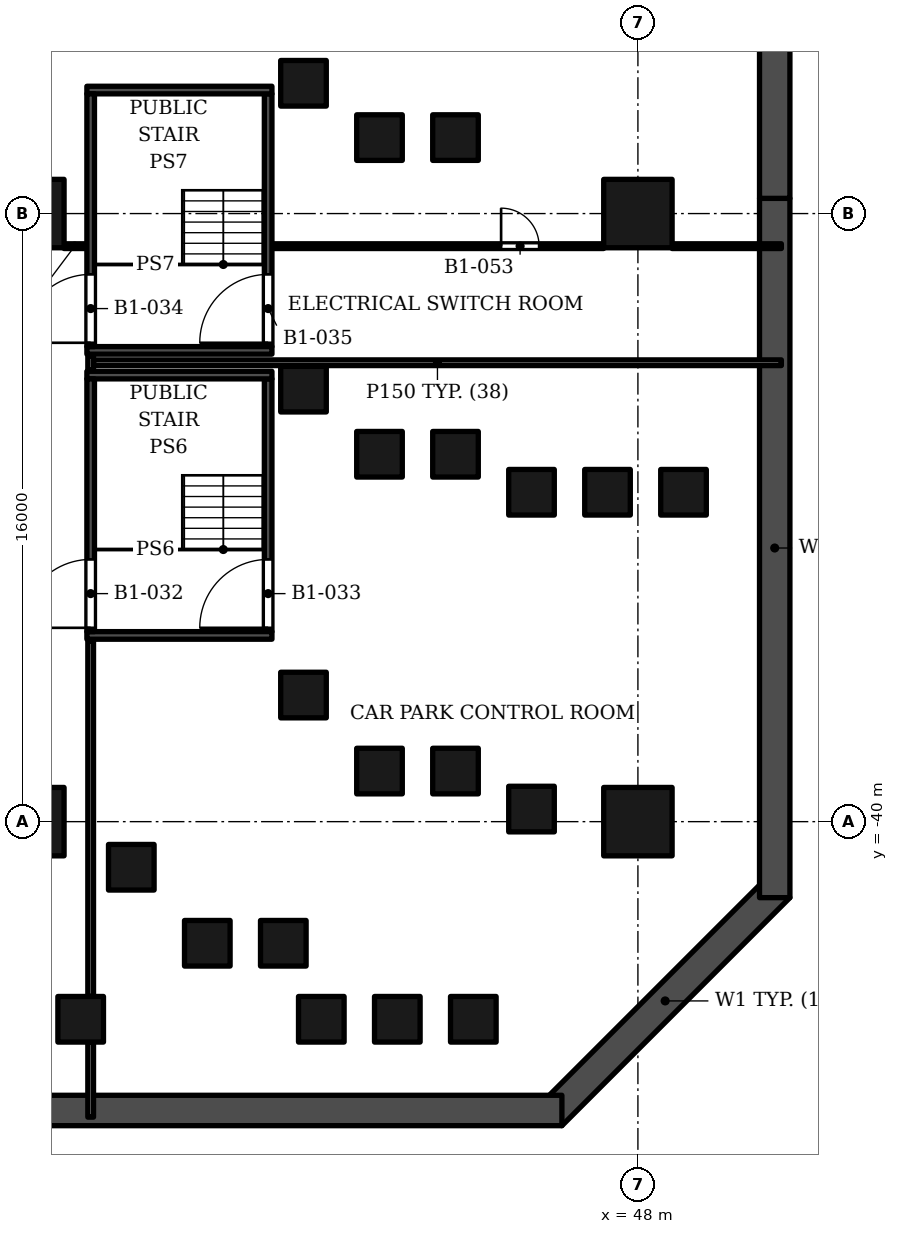
"""IFC4 building model, lengths in metres.
Left out: names, types, materials, properties, quantities, classifications, styles, units other than length and angle.
Written with IfcOpenShell. Run it as: python <this file> out.ifc"""

import sys

from ifc_helpers import new_model, si_unit, direction, frame, frame_2d, origin, origin_2d, place, context, subcontext, project, spatial, rectangle, extrude, element, fill, save


model = new_model("IFC4")
c1 = context("Model", 3, precision=1e-05, world=origin(), true_north=direction((0.0, 1.0)))
c2 = subcontext(c1, "Body", "Model", "MODEL_VIEW")
j1 = project(units=[si_unit("LENGTHUNIT", "METRE"), si_unit("PLANEANGLEUNIT", "RADIAN")], contexts=[c1])
p1 = place(None, origin())
s1 = spatial("IfcSite", under=j1, at=p1, CompositionType="ELEMENT")
p2 = place(p1, origin())
s2 = spatial("IfcBuilding", under=s1, at=p2, CompositionType="ELEMENT")
p3 = place(p2, frame((0.0, 0.0, -5.0)))
s3 = spatial("IfcBuildingStorey", under=s2, at=p3, CompositionType="ELEMENT", Elevation=-5.0)
p4 = place(p3, frame((51.6, -23.6, 0.0), z_axis=(0.0, 0.0, 1.0), x_axis=(0.0, 1.0, 0.0)))
e1 = element("IfcWall", 1, at=p4, inside=s3, PredefinedType="SHEAR", context=c2, shape_type="SweptSolid", body=[
    extrude(rectangle(XDim=12.0, YDim=0.8, at=frame_2d((6.0, 0.0))), origin(), (0.0, 0.0, 1.0), 5.0),
])
p5 = place(p4, frame((4.0, 0.0, 0.0)))
e2 = element("IfcOpeningElement", 2, at=p5, cuts=e1, PredefinedType="OPENING", context=c2, shape_type="SweptSolid", body=[
    extrude(rectangle(XDim=4.0, YDim=2.5, at=frame_2d((2.0, 1.25))), frame((0.0, 0.41, 0.0), z_axis=(0.0, -1.0, 0.0), x_axis=(1.0, 0.0, 0.0)), (0.0, 0.0, 1.0), 0.82),
])
p6 = place(p3, frame((45.717, -47.717, 0.0), z_axis=(0.0, 0.0, 1.0), x_axis=(0.707106781187, 0.707106781187, 0.0)))
e3 = element("IfcWall", 3, at=p6, inside=s3, PredefinedType="SHEAR", context=c2, shape_type="SweptSolid", body=[
    extrude(rectangle(XDim=8.485, YDim=0.8, at=frame_2d((4.243, 0.0))), origin(), (0.0, 0.0, 1.0), 5.0),
])
p7 = place(p3, frame((51.6, -42.0, 0.0), z_axis=(0.0, 0.0, 1.0), x_axis=(0.0, 1.0, 0.0)))
e4 = element("IfcWall", 4, at=p7, inside=s3, PredefinedType="SHEAR", context=c2, shape_type="SweptSolid", body=[
    extrude(rectangle(XDim=18.4, YDim=0.8, at=frame_2d((9.2, 0.0))), origin(), (0.0, 0.0, 1.0), 5.0),
])
p8 = place(p3, frame((-46.0, -47.6, 0.0), z_axis=(0.0, 0.0, 1.0), x_axis=(1.0, 0.0, 0.0)))
e5 = element("IfcWall", 5, at=p8, inside=s3, PredefinedType="SHEAR", context=c2, shape_type="SweptSolid", body=[
    extrude(rectangle(XDim=92.0, YDim=0.8, at=frame_2d((46.0, 0.0))), origin(), (0.0, 0.0, 1.0), 5.0),
])
for number, where, z_axis, x_axis in (
    (6, (32.0, -40.0, 0.0), (0.0, 0.0, 1.0), (1.0, 0.0, 0.0)),
    (7, (32.0, -24.0, 0.0), (0.0, 0.0, 1.0), (1.0, 0.0, 0.0)),
    (8, (48.0, -40.0, 0.0), (0.0, 0.0, 1.0), (1.0, 0.0, 0.0)),
    (9, (48.0, -24.0, 0.0), (0.0, 0.0, 1.0), (1.0, 0.0, 0.0)),
):
    element("IfcColumn", number, at=place(p3, frame(where, z_axis=z_axis, x_axis=x_axis)), inside=s3, PredefinedType="COLUMN", context=c2, shape_type="SweptSolid", body=[
        extrude(rectangle(XDim=1.8, YDim=1.8, at=origin_2d()), origin(), (0.0, 0.0, 1.0), 5.0),
    ])
for number, where, z_axis, x_axis in (
    (10, (39.2, -36.669, 0.0), (0.0, 0.0, 1.0), (1.0, 0.0, 0.0)),
    (11, (34.669, -41.2, 0.0), (0.0, 0.0, 1.0), (1.0, 0.0, 0.0)),
    (12, (39.2, -20.572, 0.0), (0.0, 0.0, 1.0), (1.0, 0.0, 0.0)),
    (13, (39.2, -28.62, 0.0), (0.0, 0.0, 1.0), (1.0, 0.0, 0.0)),
    (14, (41.2, -38.669, 0.0), (0.0, 0.0, 1.0), (1.0, 0.0, 0.0)),
    (15, (36.669, -43.2, 0.0), (0.0, 0.0, 1.0), (1.0, 0.0, 0.0)),
    (16, (41.2, -22.001, 0.0), (0.0, 0.0, 1.0), (1.0, 0.0, 0.0)),
    (17, (41.2, -30.333, 0.0), (0.0, 0.0, 1.0), (1.0, 0.0, 0.0)),
    (18, (43.2, -38.669, 0.0), (0.0, 0.0, 1.0), (1.0, 0.0, 0.0)),
    (19, (38.669, -43.2, 0.0), (0.0, 0.0, 1.0), (1.0, 0.0, 0.0)),
    (20, (43.2, -22.001, 0.0), (0.0, 0.0, 1.0), (1.0, 0.0, 0.0)),
    (21, (43.2, -30.333, 0.0), (0.0, 0.0, 1.0), (1.0, 0.0, 0.0)),
    (22, (45.2, -39.669, 0.0), (0.0, 0.0, 1.0), (1.0, 0.0, 0.0)),
    (23, (39.669, -45.2, 0.0), (0.0, 0.0, 1.0), (1.0, 0.0, 0.0)),
    (24, (45.2, -31.333, 0.0), (0.0, 0.0, 1.0), (1.0, 0.0, 0.0)),
    (25, (41.669, -45.2, 0.0), (0.0, 0.0, 1.0), (1.0, 0.0, 0.0)),
    (26, (47.2, -31.333, 0.0), (0.0, 0.0, 1.0), (1.0, 0.0, 0.0)),
    (27, (33.337, -45.2, 0.0), (0.0, 0.0, 1.0), (1.0, 0.0, 0.0)),
    (28, (43.669, -45.2, 0.0), (0.0, 0.0, 1.0), (1.0, 0.0, 0.0)),
    (29, (49.2, -31.333, 0.0), (0.0, 0.0, 1.0), (1.0, 0.0, 0.0)),
):
    element("IfcColumn", number, at=place(p3, frame(where, z_axis=z_axis, x_axis=x_axis)), inside=s3, PredefinedType="COLUMN", context=c2, shape_type="SweptSolid", body=[
        extrude(rectangle(XDim=1.2, YDim=1.2, at=origin_2d()), origin(), (0.0, 0.0, 1.0), 5.0),
    ])
for number, where, z_axis, x_axis in (
    (30, (33.5, -35.1, 0.0), (0.0, 0.0, 1.0), (1.0, 0.0, 0.0)),
    (31, (33.5, -28.25, 0.0), (0.0, 0.0, 1.0), (1.0, 0.0, 0.0)),
):
    element("IfcWall", number, at=place(p3, frame(where, z_axis=z_axis, x_axis=x_axis)), inside=s3, PredefinedType="SOLIDWALL", context=c2, shape_type="SweptSolid", body=[
        extrude(rectangle(XDim=4.87, YDim=0.2, at=frame_2d((2.435, 0.0))), origin(), (0.0, 0.0, 1.0), 4.45),
    ])
p9 = place(p3, frame((33.6, -35.0, 0.0), z_axis=(0.0, 0.0, 1.0), x_axis=(0.0, 1.0, 0.0)))
e32 = element("IfcWall", 32, at=p9, inside=s3, PredefinedType="SOLIDWALL", context=c2, shape_type="SweptSolid", body=[
    extrude(rectangle(XDim=6.65, YDim=0.2, at=frame_2d((3.325, 0.0))), origin(), (0.0, 0.0, 1.0), 4.45),
])
p10 = place(p9, frame((0.1, 0.0, 0.0)))
e33 = element("IfcOpeningElement", 33, at=p10, cuts=e32, PredefinedType="OPENING", context=c2, shape_type="SweptSolid", body=[
    extrude(rectangle(XDim=1.8, YDim=2.4, at=frame_2d((0.9, 1.2))), frame((0.0, 0.11, 0.0), z_axis=(0.0, -1.0, 0.0), x_axis=(1.0, 0.0, 0.0)), (0.0, 0.0, 1.0), 0.22),
])
p11 = place(p3, frame((38.27, -35.0, 0.0), z_axis=(0.0, 0.0, 1.0), x_axis=(0.0, 1.0, 0.0)))
e34 = element("IfcWall", 34, at=p11, inside=s3, PredefinedType="SOLIDWALL", context=c2, shape_type="SweptSolid", body=[
    extrude(rectangle(XDim=6.65, YDim=0.2, at=frame_2d((3.325, 0.0))), origin(), (0.0, 0.0, 1.0), 4.45),
])
p12 = place(p11, frame((0.1, 0.0, 0.0)))
e35 = element("IfcOpeningElement", 35, at=p12, cuts=e34, PredefinedType="OPENING", context=c2, shape_type="SweptSolid", body=[
    extrude(rectangle(XDim=1.8, YDim=2.4, at=frame_2d((0.9, 1.2))), frame((0.0, 0.11, 0.0), z_axis=(0.0, -1.0, 0.0), x_axis=(1.0, 0.0, 0.0)), (0.0, 0.0, 1.0), 0.22),
])
for number, where, z_axis, x_axis in (
    (36, (33.5, -27.6, 0.0), (0.0, 0.0, 1.0), (1.0, 0.0, 0.0)),
    (37, (33.5, -20.75, 0.0), (0.0, 0.0, 1.0), (1.0, 0.0, 0.0)),
):
    element("IfcWall", number, at=place(p3, frame(where, z_axis=z_axis, x_axis=x_axis)), inside=s3, PredefinedType="SOLIDWALL", context=c2, shape_type="SweptSolid", body=[
        extrude(rectangle(XDim=4.87, YDim=0.2, at=frame_2d((2.435, 0.0))), origin(), (0.0, 0.0, 1.0), 4.45),
    ])
p13 = place(p3, frame((33.6, -27.5, 0.0), z_axis=(0.0, 0.0, 1.0), x_axis=(0.0, 1.0, 0.0)))
e38 = element("IfcWall", 38, at=p13, inside=s3, PredefinedType="SOLIDWALL", context=c2, shape_type="SweptSolid", body=[
    extrude(rectangle(XDim=6.65, YDim=0.2, at=frame_2d((3.325, 0.0))), origin(), (0.0, 0.0, 1.0), 4.45),
])
p14 = place(p13, frame((0.1, 0.0, 0.0)))
e39 = element("IfcOpeningElement", 39, at=p14, cuts=e38, PredefinedType="OPENING", context=c2, shape_type="SweptSolid", body=[
    extrude(rectangle(XDim=1.8, YDim=2.4, at=frame_2d((0.9, 1.2))), frame((0.0, 0.11, 0.0), z_axis=(0.0, -1.0, 0.0), x_axis=(1.0, 0.0, 0.0)), (0.0, 0.0, 1.0), 0.22),
])
p15 = place(p3, frame((38.27, -27.5, 0.0), z_axis=(0.0, 0.0, 1.0), x_axis=(0.0, 1.0, 0.0)))
e40 = element("IfcWall", 40, at=p15, inside=s3, PredefinedType="SOLIDWALL", context=c2, shape_type="SweptSolid", body=[
    extrude(rectangle(XDim=6.65, YDim=0.2, at=frame_2d((3.325, 0.0))), origin(), (0.0, 0.0, 1.0), 4.45),
])
p16 = place(p15, frame((0.1, 0.0, 0.0)))
e41 = element("IfcOpeningElement", 41, at=p16, cuts=e40, PredefinedType="OPENING", context=c2, shape_type="SweptSolid", body=[
    extrude(rectangle(XDim=1.8, YDim=2.4, at=frame_2d((0.9, 1.2))), frame((0.0, 0.11, 0.0), z_axis=(0.0, -1.0, 0.0), x_axis=(1.0, 0.0, 0.0)), (0.0, 0.0, 1.0), 0.22),
])
p17 = place(p3, frame((33.6, -47.775, 0.0), z_axis=(0.0, 0.0, 1.0), x_axis=(0.0, 1.0, 0.0)))
e42 = element("IfcWall", 42, at=p17, inside=s3, PredefinedType="PARTITIONING", context=c2, shape_type="SweptSolid", body=[
    extrude(rectangle(XDim=1.975, YDim=0.15, at=frame_2d((0.987, 0.0))), origin(), (0.0, 0.0, 1.0), 4.45),
])
p18 = place(p3, frame((33.6, -44.6, 0.0), z_axis=(0.0, 0.0, 1.0), x_axis=(0.0, 1.0, 0.0)))
e43 = element("IfcWall", 43, at=p18, inside=s3, PredefinedType="PARTITIONING", context=c2, shape_type="SweptSolid", body=[
    extrude(rectangle(XDim=9.36, YDim=0.15, at=frame_2d((4.68, 0.0))), origin(), (0.0, 0.0, 1.0), 3.25),
])
p19 = place(p3, frame((33.6, -28.11, 0.0), z_axis=(0.0, 0.0, 1.0), x_axis=(0.0, 1.0, 0.0)))
e44 = element("IfcWall", 44, at=p19, inside=s3, PredefinedType="PARTITIONING", context=c2, shape_type="SweptSolid", body=[
    extrude(rectangle(XDim=0.37, YDim=0.15, at=frame_2d((0.185, 0.0))), origin(), (0.0, 0.0, 1.0), 4.45),
])
p20 = place(p3, frame((33.675, -27.925, 0.0), z_axis=(0.0, 0.0, 1.0), x_axis=(1.0, 0.0, 0.0)))
e45 = element("IfcWall", 45, at=p20, inside=s3, PredefinedType="PARTITIONING", context=c2, shape_type="SweptSolid", body=[
    extrude(rectangle(XDim=18.1, YDim=0.15, at=frame_2d((9.05, 0.0))), origin(), (0.0, 0.0, 1.0), 3.55),
])
p21 = place(p3, frame((32.9, -24.857, 0.0), z_axis=(0.0, 0.0, 1.0), x_axis=(1.0, 0.0, 0.0)))
e46 = element("IfcWall", 46, at=p21, inside=s3, PredefinedType="PARTITIONING", context=c2, shape_type="SweptSolid", body=[
    extrude(rectangle(XDim=0.56, YDim=0.125, at=frame_2d((0.28, 0.0))), origin(), (0.0, 0.0, 1.0), 4.45),
])
p22 = place(p3, frame((38.41, -24.857, 0.0), z_axis=(0.0, 0.0, 1.0), x_axis=(1.0, 0.0, 0.0)))
e47 = element("IfcWall", 47, at=p22, inside=s3, PredefinedType="PARTITIONING", context=c2, shape_type="SweptSolid", body=[
    extrude(rectangle(XDim=8.69, YDim=0.125, at=frame_2d((4.345, 0.0))), origin(), (0.0, 0.0, 1.0), 4.45),
])
p23 = place(p22, frame((5.99, 0.0, 0.0)))
e48 = element("IfcOpeningElement", 48, at=p23, cuts=e47, PredefinedType="OPENING", context=c2, shape_type="SweptSolid", body=[
    extrude(rectangle(XDim=1.0, YDim=2.1, at=frame_2d((0.5, 1.05))), frame((0.0, 0.073, 0.0), z_axis=(0.0, -1.0, 0.0), x_axis=(1.0, 0.0, 0.0)), (0.0, 0.0, 1.0), 0.145),
])
p24 = place(p3, frame((48.9, -24.857, 0.0), z_axis=(0.0, 0.0, 1.0), x_axis=(1.0, 0.0, 0.0)))
e49 = element("IfcWall", 49, at=p24, inside=s3, PredefinedType="PARTITIONING", context=c2, shape_type="SweptSolid", body=[
    extrude(rectangle(XDim=2.875, YDim=0.125, at=frame_2d((1.438, 0.0))), origin(), (0.0, 0.0, 1.0), 3.55),
])
p25 = place(p10, origin())
e50 = element("IfcDoor", 50, at=p25, inside=s3, OperationType="DOUBLE_DOOR_SINGLE_SWING", PredefinedType="DOOR", context=c2, shape_type="SweptSolid", body=[
    extrude(rectangle(XDim=1.8, YDim=2.4, at=frame_2d((0.9, 1.2))), frame((0.0, 0.025, 0.0), z_axis=(0.0, -1.0, 0.0), x_axis=(1.0, 0.0, 0.0)), (0.0, 0.0, 1.0), 0.05),
])
fill(e33, e50)
p26 = place(p12, origin())
e51 = element("IfcDoor", 51, at=p26, inside=s3, OperationType="DOUBLE_DOOR_SINGLE_SWING", PredefinedType="DOOR", context=c2, shape_type="SweptSolid", body=[
    extrude(rectangle(XDim=1.8, YDim=2.4, at=frame_2d((0.9, 1.2))), frame((0.0, 0.025, 0.0), z_axis=(0.0, -1.0, 0.0), x_axis=(1.0, 0.0, 0.0)), (0.0, 0.0, 1.0), 0.05),
])
fill(e35, e51)
p27 = place(p14, origin())
e52 = element("IfcDoor", 52, at=p27, inside=s3, OperationType="DOUBLE_DOOR_SINGLE_SWING", PredefinedType="DOOR", context=c2, shape_type="SweptSolid", body=[
    extrude(rectangle(XDim=1.8, YDim=2.4, at=frame_2d((0.9, 1.2))), frame((0.0, 0.025, 0.0), z_axis=(0.0, -1.0, 0.0), x_axis=(1.0, 0.0, 0.0)), (0.0, 0.0, 1.0), 0.05),
])
fill(e39, e52)
p28 = place(p16, origin())
e53 = element("IfcDoor", 53, at=p28, inside=s3, OperationType="DOUBLE_DOOR_SINGLE_SWING", PredefinedType="DOOR", context=c2, shape_type="SweptSolid", body=[
    extrude(rectangle(XDim=1.8, YDim=2.4, at=frame_2d((0.9, 1.2))), frame((0.0, 0.025, 0.0), z_axis=(0.0, -1.0, 0.0), x_axis=(1.0, 0.0, 0.0)), (0.0, 0.0, 1.0), 0.05),
])
fill(e41, e53)
p29 = place(p23, origin())
e54 = element("IfcDoor", 54, at=p29, inside=s3, OperationType="SINGLE_SWING_LEFT", PredefinedType="DOOR", context=c2, shape_type="SweptSolid", body=[
    extrude(rectangle(XDim=1.0, YDim=2.1, at=frame_2d((0.5, 1.05))), frame((0.0, 0.025, 0.0), z_axis=(0.0, -1.0, 0.0), x_axis=(1.0, 0.0, 0.0)), (0.0, 0.0, 1.0), 0.05),
])
fill(e48, e54)
save(model, sys.argv[1])
